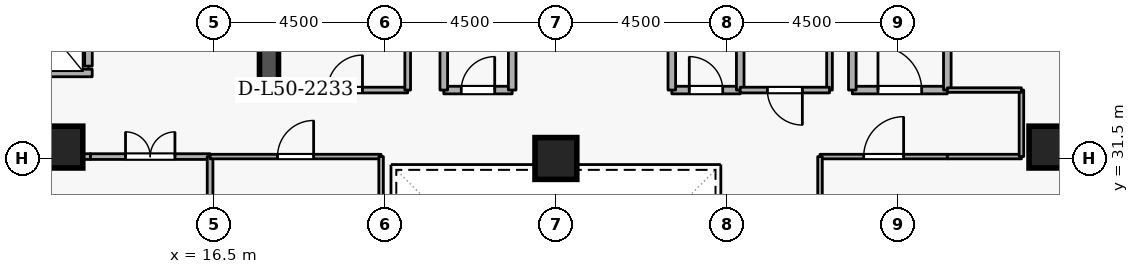
"""IFC4 building model, lengths in metres.
Left out: names, types, materials, properties, quantities, classifications, styles, units other than length and angle.
Written with IfcOpenShell. Run it as: python <this file> out.ifc"""

import sys

from ifc_helpers import new_model, si_unit, direction, frame, frame_2d, origin, origin_2d, place, context, subcontext, project, spatial, rectangle, extrude, element, fill, save


model = new_model("IFC4")
c1 = context("Model", 3, precision=1e-05, world=origin(), true_north=direction((0.0, 1.0)))
c2 = subcontext(c1, "Body", "Model", "MODEL_VIEW")
j1 = project(units=[si_unit("LENGTHUNIT", "METRE"), si_unit("PLANEANGLEUNIT", "RADIAN")], contexts=[c1])
p1 = place(None, origin())
s1 = spatial("IfcSite", under=j1, at=p1, CompositionType="ELEMENT")
p2 = place(p1, origin())
s2 = spatial("IfcBuilding", under=s1, at=p2, CompositionType="ELEMENT")
p3 = place(p2, frame((0.0, 0.0, 189.3)))
s3 = spatial("IfcBuildingStorey", under=s2, at=p3, CompositionType="ELEMENT", Elevation=189.3)
p4 = place(p3, frame((17.95, 33.1, 0.0), z_axis=(0.0, 0.0, 1.0), x_axis=(0.0, 1.0, 0.0)))
e1 = element("IfcWall", 1, at=p4, inside=s3, PredefinedType="SHEAR", context=c2, shape_type="SweptSolid", body=[
    extrude(rectangle(XDim=5.8, YDim=0.5, at=frame_2d((2.9, 0.0))), origin(), (0.0, 0.0, 1.0), 3.6),
])
for number, where, z_axis, x_axis in (
    (2, (12.5, 31.8, 0.0), (0.0, 0.0, 1.0), (1.0, 0.0, 0.0)),
    (3, (38.5, 31.8, 0.0), (0.0, 0.0, 1.0), (1.0, 0.0, 0.0)),
    (4, (25.5, 31.5, 0.0), (0.0, 0.0, 1.0), (1.0, 0.0, 0.0)),
):
    element("IfcColumn", number, at=place(p3, frame(where, z_axis=z_axis, x_axis=x_axis)), inside=s3, PredefinedType="COLUMN", context=c2, shape_type="SweptSolid", body=[
        extrude(rectangle(XDim=1.1, YDim=1.1, at=origin_2d()), origin(), (0.0, 0.0, 1.0), 3.6),
    ])
p5 = place(p3, frame((13.2, 33.93, 0.0), z_axis=(0.0, 0.0, 1.0), x_axis=(0.0, 1.0, 0.0)))
e5 = element("IfcWall", 5, at=p5, inside=s3, PredefinedType="STANDARD", context=c2, shape_type="SweptSolid", body=[
    extrude(rectangle(XDim=1.94, YDim=0.2, at=frame_2d((0.97, 0.0))), origin(), (0.0, 0.0, 1.0), 3.34),
])
p6 = place(p5, frame((0.46, 0.0, 0.0)))
e6 = element("IfcOpeningElement", 6, at=p6, cuts=e5, PredefinedType="OPENING", context=c2, shape_type="SweptSolid", body=[
    extrude(rectangle(XDim=1.02, YDim=2.06, at=frame_2d((0.51, 1.03))), frame((0.0, 0.11, 0.0), z_axis=(0.0, -1.0, 0.0), x_axis=(1.0, 0.0, 0.0)), (0.0, 0.0, 1.0), 0.22),
])
p7 = place(p3, frame((11.002, 33.75, 0.0), z_axis=(0.0, 0.0, 1.0), x_axis=(1.0, 0.0, 0.0)))
e7 = element("IfcWall", 7, at=p7, inside=s3, PredefinedType="STANDARD", context=c2, shape_type="SweptSolid", body=[
    extrude(rectangle(XDim=2.296, YDim=0.2, at=frame_2d((1.148, 0.0))), origin(), (0.0, 0.0, 1.0), 3.34),
])
p8 = place(p3, frame((33.3, 33.3, 0.0), z_axis=(0.0, 0.0, 1.0), x_axis=(1.0, 0.0, 0.0)))
e8 = element("IfcWall", 8, at=p8, inside=s3, PredefinedType="STANDARD", context=c2, shape_type="SweptSolid", body=[
    extrude(rectangle(XDim=2.5, YDim=0.2, at=frame_2d((1.25, 0.0))), origin(), (0.0, 0.0, 1.0), 3.34),
])
p9 = place(p8, frame((0.675, 0.0, 0.0)))
e9 = element("IfcOpeningElement", 9, at=p9, cuts=e8, PredefinedType="OPENING", context=c2, shape_type="SweptSolid", body=[
    extrude(rectangle(XDim=1.15, YDim=2.1, at=frame_2d((0.575, 1.05))), frame((0.0, 0.11, 0.0), z_axis=(0.0, -1.0, 0.0), x_axis=(1.0, 0.0, 0.0)), (0.0, 0.0, 1.0), 0.22),
])
p10 = place(p3, frame((35.8, 33.3, 0.0), z_axis=(0.0, 0.0, 1.0), x_axis=(0.0, 1.0, 0.0)))
e10 = element("IfcWall", 10, at=p10, inside=s3, PredefinedType="STANDARD", context=c2, shape_type="SweptSolid", body=[
    extrude(rectangle(XDim=5.7, YDim=0.2, at=frame_2d((2.85, 0.0))), origin(), (0.0, 0.0, 1.0), 3.34),
])
p11 = place(p3, frame((33.3, 35.6, 0.0), z_axis=(0.0, 0.0, 1.0), x_axis=(0.0, -1.0, 0.0)))
e11 = element("IfcWall", 11, at=p11, inside=s3, PredefinedType="STANDARD", context=c2, shape_type="SweptSolid", body=[
    extrude(rectangle(XDim=2.3, YDim=0.2, at=frame_2d((1.15, 0.0))), origin(), (0.0, 0.0, 1.0), 2.545),
])
p12 = place(p3, frame((22.55, 33.3, 0.0), z_axis=(0.0, 0.0, 1.0), x_axis=(1.0, 0.0, 0.0)))
e12 = element("IfcWall", 12, at=p12, inside=s3, PredefinedType="STANDARD", context=c2, shape_type="SweptSolid", body=[
    extrude(rectangle(XDim=1.8, YDim=0.2, at=frame_2d((0.9, 0.0))), origin(), (0.0, 0.0, 1.0), 3.34),
])
p13 = place(p12, frame((0.46, 0.0, 0.0)))
e13 = element("IfcOpeningElement", 13, at=p13, cuts=e12, PredefinedType="OPENING", context=c2, shape_type="SweptSolid", body=[
    extrude(rectangle(XDim=0.88, YDim=2.04, at=frame_2d((0.44, 1.02))), frame((0.0, 0.11, 0.0), z_axis=(0.0, -1.0, 0.0), x_axis=(1.0, 0.0, 0.0)), (0.0, 0.0, 1.0), 0.22),
])
for number, where, z_axis, x_axis in (
    (14, (24.35, 33.3, 0.0), (0.0, 0.0, 1.0), (0.0, 1.0, 0.0)),
    (15, (22.55, 35.35, 0.0), (0.0, 0.0, 1.0), (0.0, -1.0, 0.0)),
):
    element("IfcWall", number, at=place(p3, frame(where, z_axis=z_axis, x_axis=x_axis)), inside=s3, PredefinedType="STANDARD", context=c2, shape_type="SweptSolid", body=[
        extrude(rectangle(XDim=2.05, YDim=0.2, at=frame_2d((1.025, 0.0))), origin(), (0.0, 0.0, 1.0), 3.34),
    ])
p14 = place(p3, frame((28.55, 33.3, 0.0), z_axis=(0.0, 0.0, 1.0), x_axis=(1.0, 0.0, 0.0)))
e16 = element("IfcWall", 16, at=p14, inside=s3, PredefinedType="STANDARD", context=c2, shape_type="SweptSolid", body=[
    extrude(rectangle(XDim=1.8, YDim=0.2, at=frame_2d((0.9, 0.0))), origin(), (0.0, 0.0, 1.0), 3.34),
])
p15 = place(p14, frame((0.46, 0.0, 0.0)))
e17 = element("IfcOpeningElement", 17, at=p15, cuts=e16, PredefinedType="OPENING", context=c2, shape_type="SweptSolid", body=[
    extrude(rectangle(XDim=0.88, YDim=2.04, at=frame_2d((0.44, 1.02))), frame((0.0, 0.11, 0.0), z_axis=(0.0, -1.0, 0.0), x_axis=(1.0, 0.0, 0.0)), (0.0, 0.0, 1.0), 0.22),
])
for number, where, z_axis, x_axis in (
    (18, (30.35, 33.3, 0.0), (0.0, 0.0, 1.0), (0.0, 1.0, 0.0)),
    (19, (28.55, 35.35, 0.0), (0.0, 0.0, 1.0), (0.0, -1.0, 0.0)),
):
    element("IfcWall", number, at=place(p3, frame(where, z_axis=z_axis, x_axis=x_axis)), inside=s3, PredefinedType="STANDARD", context=c2, shape_type="SweptSolid", body=[
        extrude(rectangle(XDim=2.05, YDim=0.2, at=frame_2d((1.025, 0.0))), origin(), (0.0, 0.0, 1.0), 3.34),
    ])
p16 = place(p3, frame((18.3, 33.3, 0.0), z_axis=(0.0, 0.0, 1.0), x_axis=(1.0, 0.0, 0.0)))
e20 = element("IfcWall", 20, at=p16, inside=s3, PredefinedType="PARTITIONING", context=c2, shape_type="SweptSolid", body=[
    extrude(rectangle(XDim=3.3, YDim=0.15, at=frame_2d((1.65, 0.0))), origin(), (0.0, 0.0, 1.0), 3.34),
])
p17 = place(p16, frame((1.19, 0.0, 0.0)))
e21 = element("IfcOpeningElement", 21, at=p17, cuts=e20, PredefinedType="OPENING", context=c2, shape_type="SweptSolid", body=[
    extrude(rectangle(XDim=0.92, YDim=2.08, at=frame_2d((0.46, 1.04))), frame((0.0, 0.085, 0.0), z_axis=(0.0, -1.0, 0.0), x_axis=(1.0, 0.0, 0.0)), (0.0, 0.0, 1.0), 0.17),
])
p18 = place(p3, frame((21.6, 33.3, 0.0), z_axis=(0.0, 0.0, 1.0), x_axis=(0.0, 1.0, 0.0)))
e22 = element("IfcWall", 22, at=p18, inside=s3, PredefinedType="PARTITIONING", context=c2, shape_type="SweptSolid", body=[
    extrude(rectangle(XDim=2.05, YDim=0.15, at=frame_2d((1.025, 0.0))), origin(), (0.0, 0.0, 1.0), 3.34),
])
p19 = place(p3, frame((32.7, 35.35, 0.0), z_axis=(0.0, 0.0, 1.0), x_axis=(0.0, -1.0, 0.0)))
e23 = element("IfcWall", 23, at=p19, inside=s3, PredefinedType="PARTITIONING", context=c2, shape_type="SweptSolid", body=[
    extrude(rectangle(XDim=2.05, YDim=0.15, at=frame_2d((1.025, 0.0))), origin(), (0.0, 0.0, 1.0), 2.545),
])
p20 = place(p3, frame((32.7, 33.3, 0.0), z_axis=(0.0, 0.0, 1.0), x_axis=(-1.0, 0.0, 0.0)))
e24 = element("IfcWall", 24, at=p20, inside=s3, PredefinedType="PARTITIONING", context=c2, shape_type="SweptSolid", body=[
    extrude(rectangle(XDim=2.35, YDim=0.15, at=frame_2d((1.175, 0.0))), origin(), (0.0, 0.0, 1.0), 3.34),
])
p21 = place(p20, frame((0.715, 0.0, 0.0)))
e25 = element("IfcOpeningElement", 25, at=p21, cuts=e24, PredefinedType="OPENING", context=c2, shape_type="SweptSolid", body=[
    extrude(rectangle(XDim=0.92, YDim=2.08, at=frame_2d((0.46, 1.04))), frame((0.0, 0.085, 0.0), z_axis=(0.0, -1.0, 0.0), x_axis=(1.0, 0.0, 0.0)), (0.0, 0.0, 1.0), 0.17),
])
p22 = place(p3, frame((13.25, 31.55, 0.0), z_axis=(0.0, 0.0, 1.0), x_axis=(1.0, 0.0, 0.0)))
e26 = element("IfcWall", 26, at=p22, inside=s3, PredefinedType="PARTITIONING", context=c2, shape_type="SweptSolid", body=[
    extrude(rectangle(XDim=3.15, YDim=0.15, at=frame_2d((1.575, 0.0))), origin(), (0.0, 0.0, 1.0), 3.34),
])
p23 = place(p22, frame((0.925, 0.0, 0.0)))
e27 = element("IfcOpeningElement", 27, at=p23, cuts=e26, PredefinedType="OPENING", context=c2, shape_type="SweptSolid", body=[
    extrude(rectangle(XDim=1.3, YDim=2.12, at=frame_2d((0.65, 1.06))), frame((0.0, 0.085, 0.0), z_axis=(0.0, -1.0, 0.0), x_axis=(1.0, 0.0, 0.0)), (0.0, 0.0, 1.0), 0.17),
])
p24 = place(p3, frame((16.4, 31.55, 0.0), z_axis=(0.0, 0.0, 1.0), x_axis=(0.0, -1.0, 0.0)))
e28 = element("IfcWall", 28, at=p24, inside=s3, PredefinedType="PARTITIONING", context=c2, shape_type="SweptSolid", body=[
    extrude(rectangle(XDim=4.55, YDim=0.15, at=frame_2d((2.275, 0.0))), origin(), (0.0, 0.0, 1.0), 3.34),
])
p25 = place(p3, frame((10.9, 31.55, 0.0), z_axis=(0.0, 0.0, 1.0), x_axis=(1.0, 0.0, 0.0)))
e29 = element("IfcWall", 29, at=p25, inside=s3, PredefinedType="PARTITIONING", context=c2, shape_type="SweptSolid", body=[
    extrude(rectangle(XDim=2.35, YDim=0.15, at=frame_2d((1.175, 0.0))), origin(), (0.0, 0.0, 1.0), 3.34),
])
p26 = place(p3, frame((16.4, 31.55, 0.0), z_axis=(0.0, 0.0, 1.0), x_axis=(1.0, 0.0, 0.0)))
e30 = element("IfcWall", 30, at=p26, inside=s3, PredefinedType="PARTITIONING", context=c2, shape_type="SweptSolid", body=[
    extrude(rectangle(XDim=4.5, YDim=0.12, at=frame_2d((2.25, 0.0))), origin(), (0.0, 0.0, 1.0), 3.34),
])
p27 = place(p26, frame((1.775, 0.0, 0.0)))
e31 = element("IfcOpeningElement", 31, at=p27, cuts=e30, PredefinedType="OPENING", context=c2, shape_type="SweptSolid", body=[
    extrude(rectangle(XDim=0.95, YDim=2.1, at=frame_2d((0.475, 1.05))), frame((0.0, 0.07, 0.0), z_axis=(0.0, -1.0, 0.0), x_axis=(1.0, 0.0, 0.0)), (0.0, 0.0, 1.0), 0.14),
])
p28 = place(p3, frame((20.9, 31.55, 0.0), z_axis=(0.0, 0.0, 1.0), x_axis=(0.0, -1.0, 0.0)))
e32 = element("IfcWall", 32, at=p28, inside=s3, PredefinedType="PARTITIONING", context=c2, shape_type="SweptSolid", body=[
    extrude(rectangle(XDim=9.1, YDim=0.12, at=frame_2d((4.55, 0.0))), origin(), (0.0, 0.0, 1.0), 3.34),
])
p29 = place(p3, frame((32.45, 31.55, 0.0), z_axis=(0.0, 0.0, 1.0), x_axis=(1.0, 0.0, 0.0)))
e33 = element("IfcWall", 33, at=p29, inside=s3, PredefinedType="PARTITIONING", context=c2, shape_type="SweptSolid", body=[
    extrude(rectangle(XDim=3.35, YDim=0.12, at=frame_2d((1.675, 0.0))), origin(), (0.0, 0.0, 1.0), 3.34),
])
p30 = place(p29, frame((1.15, 0.0, 0.0)))
e34 = element("IfcOpeningElement", 34, at=p30, cuts=e33, PredefinedType="OPENING", context=c2, shape_type="SweptSolid", body=[
    extrude(rectangle(XDim=1.05, YDim=2.1, at=frame_2d((0.525, 1.05))), frame((0.0, 0.07, 0.0), z_axis=(0.0, -1.0, 0.0), x_axis=(1.0, 0.0, 0.0)), (0.0, 0.0, 1.0), 0.14),
])
p31 = place(p3, frame((35.8, 31.55, 0.0), z_axis=(0.0, 0.0, 1.0), x_axis=(1.0, 0.0, 0.0)))
e35 = element("IfcWall", 35, at=p31, inside=s3, PredefinedType="PARTITIONING", context=c2, shape_type="SweptSolid", body=[
    extrude(rectangle(XDim=1.95, YDim=0.12, at=frame_2d((0.975, 0.0))), origin(), (0.0, 0.0, 1.0), 3.34),
])
p32 = place(p3, frame((37.75, 31.55, 0.0), z_axis=(0.0, 0.0, 1.0), x_axis=(0.0, 1.0, 0.0)))
e36 = element("IfcWall", 36, at=p32, inside=s3, PredefinedType="PARTITIONING", context=c2, shape_type="SweptSolid", body=[
    extrude(rectangle(XDim=1.75, YDim=0.12, at=frame_2d((0.875, 0.0))), origin(), (0.0, 0.0, 1.0), 3.34),
])
p33 = place(p3, frame((37.75, 33.3, 0.0), z_axis=(0.0, 0.0, 1.0), x_axis=(-1.0, 0.0, 0.0)))
e37 = element("IfcWall", 37, at=p33, inside=s3, PredefinedType="PARTITIONING", context=c2, shape_type="SweptSolid", body=[
    extrude(rectangle(XDim=1.95, YDim=0.12, at=frame_2d((0.975, 0.0))), origin(), (0.0, 0.0, 1.0), 3.34),
])
p34 = place(p3, frame((32.45, 29.25, 0.0), z_axis=(0.0, 0.0, 1.0), x_axis=(0.0, 1.0, 0.0)))
e38 = element("IfcWall", 38, at=p34, inside=s3, PredefinedType="PARTITIONING", context=c2, shape_type="SweptSolid", body=[
    extrude(rectangle(XDim=2.3, YDim=0.12, at=frame_2d((1.15, 0.0))), origin(), (0.0, 0.0, 1.0), 3.34),
])
p35 = place(p9, origin())
e39 = element("IfcDoor", 39, at=p35, inside=s3, OperationType="SINGLE_SWING_LEFT", PredefinedType="DOOR", context=c2, shape_type="SweptSolid", body=[
    extrude(rectangle(XDim=1.15, YDim=2.1, at=frame_2d((0.575, 1.05))), frame((0.0, 0.025, 0.0), z_axis=(0.0, -1.0, 0.0), x_axis=(1.0, 0.0, 0.0)), (0.0, 0.0, 1.0), 0.05),
])
fill(e9, e39)
p36 = place(p13, origin())
e40 = element("IfcDoor", 40, at=p36, inside=s3, OperationType="SINGLE_SWING_RIGHT", PredefinedType="DOOR", context=c2, shape_type="SweptSolid", body=[
    extrude(rectangle(XDim=0.88, YDim=2.04, at=frame_2d((0.44, 1.02))), frame((0.0, 0.025, 0.0), z_axis=(0.0, -1.0, 0.0), x_axis=(1.0, 0.0, 0.0)), (0.0, 0.0, 1.0), 0.05),
])
fill(e13, e40)
p37 = place(p15, origin())
e41 = element("IfcDoor", 41, at=p37, inside=s3, OperationType="SINGLE_SWING_LEFT", PredefinedType="DOOR", context=c2, shape_type="SweptSolid", body=[
    extrude(rectangle(XDim=0.88, YDim=2.04, at=frame_2d((0.44, 1.02))), frame((0.0, 0.025, 0.0), z_axis=(0.0, -1.0, 0.0), x_axis=(1.0, 0.0, 0.0)), (0.0, 0.0, 1.0), 0.05),
])
fill(e17, e41)
p38 = place(p17, origin())
e42 = element("IfcDoor", 42, at=p38, inside=s3, OperationType="SINGLE_SWING_RIGHT", PredefinedType="DOOR", context=c2, shape_type="SweptSolid", body=[
    extrude(rectangle(XDim=0.92, YDim=2.08, at=frame_2d((0.46, 1.04))), frame((0.0, 0.025, 0.0), z_axis=(0.0, -1.0, 0.0), x_axis=(1.0, 0.0, 0.0)), (0.0, 0.0, 1.0), 0.05),
])
fill(e21, e42)
p39 = place(p21, origin())
e43 = element("IfcDoor", 43, at=p39, inside=s3, OperationType="SINGLE_SWING_LEFT", PredefinedType="DOOR", context=c2, shape_type="SweptSolid", body=[
    extrude(rectangle(XDim=0.92, YDim=2.08, at=frame_2d((0.46, 1.04))), frame((0.0, 0.025, 0.0), z_axis=(0.0, -1.0, 0.0), x_axis=(1.0, 0.0, 0.0)), (0.0, 0.0, 1.0), 0.05),
])
fill(e25, e43)
p40 = place(p23, origin())
e44 = element("IfcDoor", 44, at=p40, inside=s3, OperationType="DOUBLE_DOOR_SINGLE_SWING", PredefinedType="DOOR", context=c2, shape_type="SweptSolid", body=[
    extrude(rectangle(XDim=1.3, YDim=2.12, at=frame_2d((0.65, 1.06))), frame((0.0, 0.025, 0.0), z_axis=(0.0, -1.0, 0.0), x_axis=(1.0, 0.0, 0.0)), (0.0, 0.0, 1.0), 0.05),
])
fill(e27, e44)
p41 = place(p27, origin())
e45 = element("IfcDoor", 45, at=p41, inside=s3, OperationType="SINGLE_SWING_RIGHT", PredefinedType="DOOR", context=c2, shape_type="SweptSolid", body=[
    extrude(rectangle(XDim=0.95, YDim=2.1, at=frame_2d((0.475, 1.05))), frame((0.0, 0.025, 0.0), z_axis=(0.0, -1.0, 0.0), x_axis=(1.0, 0.0, 0.0)), (0.0, 0.0, 1.0), 0.05),
])
fill(e31, e45)
p42 = place(p30, origin())
e46 = element("IfcDoor", 46, at=p42, inside=s3, OperationType="SINGLE_SWING_RIGHT", PredefinedType="DOOR", context=c2, shape_type="SweptSolid", body=[
    extrude(rectangle(XDim=1.05, YDim=2.1, at=frame_2d((0.525, 1.05))), frame((0.0, 0.025, 0.0), z_axis=(0.0, -1.0, 0.0), x_axis=(1.0, 0.0, 0.0)), (0.0, 0.0, 1.0), 0.05),
])
fill(e34, e46)
save(model, sys.argv[1])
